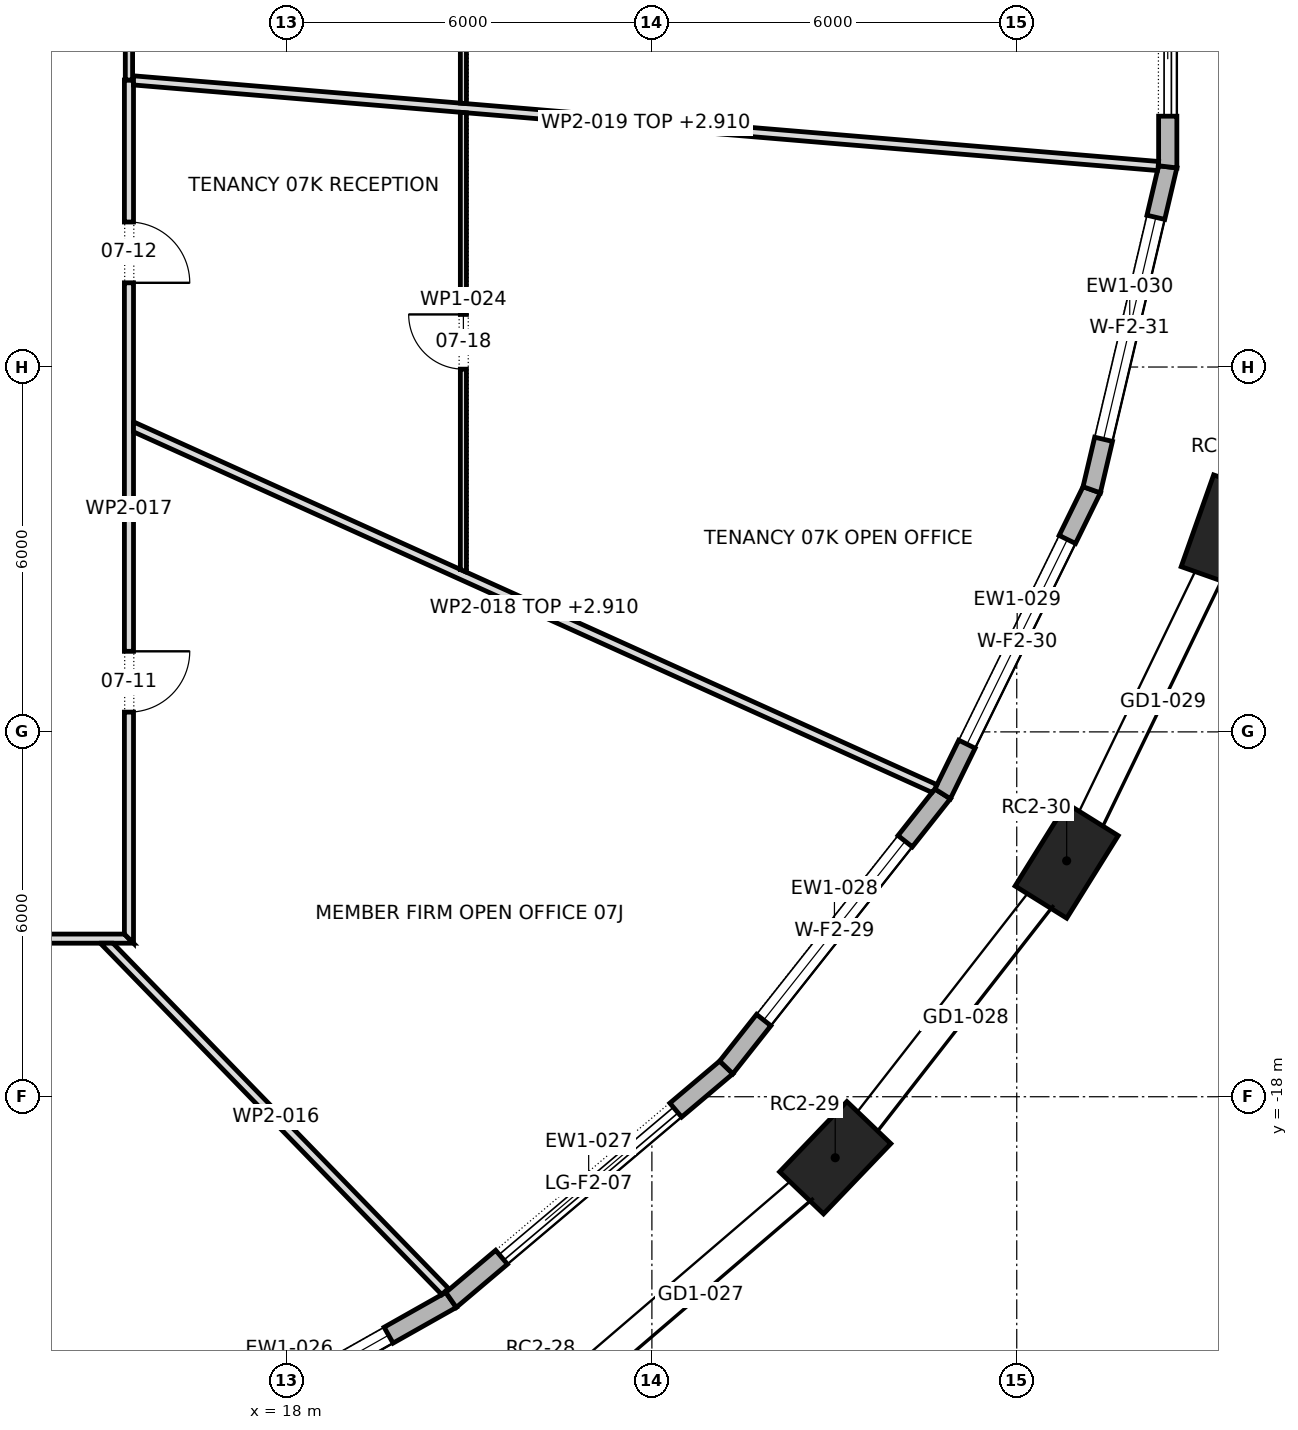
"""IFC4 building model, lengths in metres.
Left out: names, types, materials, properties, quantities, classifications, styles, units other than length and angle.
Written with IfcOpenShell. Run it as: python <this file> out.ifc"""

import sys

from ifc_helpers import new_model, si_unit, direction, frame, frame_2d, origin, origin_2d, place, context, subcontext, project, spatial, polyline, rectangle, outline, extrude, element, fill, save


model = new_model("IFC4")
c1 = context("Model", 3, precision=1e-05, world=origin(), true_north=direction((0.0, 1.0)))
c2 = subcontext(c1, "Body", "Model", "MODEL_VIEW")
j1 = project(units=[si_unit("LENGTHUNIT", "METRE"), si_unit("PLANEANGLEUNIT", "RADIAN")], contexts=[c1])
p1 = place(None, origin())
s1 = spatial("IfcSite", under=j1, at=p1, CompositionType="ELEMENT")
p2 = place(p1, origin())
s2 = spatial("IfcBuilding", under=s1, at=p2, CompositionType="ELEMENT")
p3 = place(p2, frame((0.0, 0.0, 112.9)))
s3 = spatial("IfcBuildingStorey", under=s2, at=p3, CompositionType="ELEMENT", Elevation=112.9)
for number, where, z_axis, x_axis in (
    (1, (27.015, -19.003, 0.0), (0.0, 0.0, 1.0), (0.692, 0.722, 0.0)),
    (2, (30.821, -14.121, 0.0), (0.0, 0.0, 1.0), (0.529, 0.849, 0.0)),
    (3, (33.443, -8.695, 0.0), (0.0, 0.0, 1.0), (0.334, 0.943, 0.0)),
):
    element("IfcColumn", number, at=place(p3, frame(where, z_axis=z_axis, x_axis=x_axis)), inside=s3, PredefinedType="COLUMN", context=c2, shape_type="SweptSolid", body=[
        extrude(rectangle(XDim=1.6, YDim=1.0, at=origin_2d()), origin(), (0.0, 0.0, 1.0), 4.2),
    ])
p4 = place(p3, frame((15.377, -24.344, 0.0), z_axis=(0.0, 0.0, 1.0), x_axis=(0.870828448417, 0.491587035455, 0.0)))
e4 = element("IfcWall", 4, at=p4, inside=s3, PredefinedType="STANDARD", context=c2, shape_type="SweptSolid", body=[
    extrude(outline(polyline([(-0.013, -0.15), (6.123, -0.15), (6.094, 0.15), (0.013, 0.15), (-0.013, -0.15)])), origin(), (0.0, 0.0, 1.0), 3.9),
])
p5 = place(p4, frame((1.179, 0.0, 0.6)))
e5 = element("IfcOpeningElement", 5, at=p5, cuts=e4, PredefinedType="OPENING", context=c2, shape_type="SweptSolid", body=[
    extrude(rectangle(XDim=3.75, YDim=2.85, at=frame_2d((1.875, 1.425))), frame((0.0, 0.162, 0.0), z_axis=(0.0, -1.0, 0.0), x_axis=(1.0, 0.0, 0.0)), (0.0, 0.0, 1.0), 0.324),
])
p6 = place(p3, frame((20.697, -21.341, 0.0), z_axis=(0.0, 0.0, 1.0), x_axis=(0.763894031266, 0.645341699409, 0.0)))
e6 = element("IfcWall", 6, at=p6, inside=s3, PredefinedType="STANDARD", context=c2, shape_type="SweptSolid", body=[
    extrude(outline(polyline([(-0.014, -0.15), (5.94, -0.15), (5.91, 0.15), (0.014, 0.15), (-0.014, -0.15)])), origin(), (0.0, 0.0, 1.0), 3.9),
])
p7 = place(p6, frame((1.087, 0.0, 0.0)))
e7 = element("IfcOpeningElement", 7, at=p7, cuts=e6, PredefinedType="OPENING", context=c2, shape_type="SweptSolid", body=[
    extrude(rectangle(XDim=3.75, YDim=3.45, at=frame_2d((1.875, 1.725))), frame((0.0, 0.162, 0.0), z_axis=(0.0, -1.0, 0.0), x_axis=(1.0, 0.0, 0.0)), (0.0, 0.0, 1.0), 0.324),
])
p8 = place(p3, frame((25.223, -17.518, 0.0), z_axis=(0.0, 0.0, 1.0), x_axis=(0.620329992039, 0.784340934146, 0.0)))
e8 = element("IfcWall", 8, at=p8, inside=s3, PredefinedType="STANDARD", context=c2, shape_type="SweptSolid", body=[
    extrude(outline(polyline([(-0.015, -0.15), (5.751, -0.15), (5.719, 0.15), (0.015, 0.15), (-0.015, -0.15)])), origin(), (0.0, 0.0, 1.0), 3.9),
])
p9 = place(p8, frame((0.993, 0.0, 0.6)))
e9 = element("IfcOpeningElement", 9, at=p9, cuts=e8, PredefinedType="OPENING", context=c2, shape_type="SweptSolid", body=[
    extrude(rectangle(XDim=3.75, YDim=2.85, at=frame_2d((1.875, 1.425))), frame((0.0, 0.162, 0.0), z_axis=(0.0, -1.0, 0.0), x_axis=(1.0, 0.0, 0.0)), (0.0, 0.0, 1.0), 0.324),
])
p10 = place(p3, frame((28.781, -13.019, 0.0), z_axis=(0.0, 0.0, 1.0), x_axis=(0.440238988749, 0.897880633929, 0.0)))
e10 = element("IfcWall", 10, at=p10, inside=s3, PredefinedType="STANDARD", context=c2, shape_type="SweptSolid", body=[
    extrude(outline(polyline([(-0.016, -0.15), (5.586, -0.15), (5.553, 0.15), (0.016, 0.15), (-0.016, -0.15)])), origin(), (0.0, 0.0, 1.0), 3.9),
])
p11 = place(p10, frame((0.91, 0.0, 0.6)))
e11 = element("IfcOpeningElement", 11, at=p11, cuts=e10, PredefinedType="OPENING", context=c2, shape_type="SweptSolid", body=[
    extrude(rectangle(XDim=3.75, YDim=2.85, at=frame_2d((1.875, 1.425))), frame((0.0, 0.162, 0.0), z_axis=(0.0, -1.0, 0.0), x_axis=(1.0, 0.0, 0.0)), (0.0, 0.0, 1.0), 0.324),
])
p12 = place(p3, frame((31.233, -8.019, 0.0), z_axis=(0.0, 0.0, 1.0), x_axis=(0.229193964616, 0.973380771632, 0.0)))
e12 = element("IfcWall", 12, at=p12, inside=s3, PredefinedType="STANDARD", context=c2, shape_type="SweptSolid", body=[
    extrude(outline(polyline([(-0.017, -0.15), (5.473, -0.15), (5.439, 0.15), (0.017, 0.15), (-0.017, -0.15)])), origin(), (0.0, 0.0, 1.0), 3.9),
])
p13 = place(p12, frame((0.853, 0.0, 0.6)))
e13 = element("IfcOpeningElement", 13, at=p13, cuts=e12, PredefinedType="OPENING", context=c2, shape_type="SweptSolid", body=[
    extrude(rectangle(XDim=3.75, YDim=2.85, at=frame_2d((1.875, 1.425))), frame((0.0, 0.162, 0.0), z_axis=(0.0, -1.0, 0.0), x_axis=(1.0, 0.0, 0.0)), (0.0, 0.0, 1.0), 0.324),
])
p14 = place(p3, frame((32.483, -2.708, 0.0), z_axis=(0.0, 0.0, 1.0), x_axis=(0.0, 1.0, 0.0)))
e14 = element("IfcWall", 14, at=p14, inside=s3, PredefinedType="STANDARD", context=c2, shape_type="SweptSolid", body=[
    extrude(outline(polyline([(-0.017, -0.15), (5.433, -0.15), (5.398, 0.15), (0.017, 0.15), (-0.017, -0.15)])), origin(), (0.0, 0.0, 1.0), 3.9),
])
p15 = place(p14, frame((0.833, 0.0, 0.0)))
e15 = element("IfcOpeningElement", 15, at=p15, cuts=e14, PredefinedType="OPENING", context=c2, shape_type="SweptSolid", body=[
    extrude(rectangle(XDim=3.75, YDim=3.45, at=frame_2d((1.875, 1.725))), frame((0.0, 0.162, 0.0), z_axis=(0.0, -1.0, 0.0), x_axis=(1.0, 0.0, 0.0)), (0.0, 0.0, 1.0), 0.324),
])
p16 = place(p3, frame((-15.475, -15.4, 0.0), z_axis=(0.0, 0.0, 1.0), x_axis=(1.0, 0.0, 0.0)))
e16 = element("IfcWall", 16, at=p16, inside=s3, PredefinedType="PARTITIONING", context=c2, shape_type="SweptSolid", body=[
    extrude(outline(polyline([(0.0, -0.075), (1.935, -0.075), (3.869, -0.075), (5.803, -0.075), (7.738, -0.075), (9.672, -0.075), (11.606, -0.075), (13.541, -0.075), (15.475, -0.075), (17.409, -0.075), (19.344, -0.075), (21.278, -0.075), (23.212, -0.075), (25.147, -0.075), (27.081, -0.075), (29.016, -0.075), (30.95, -0.075), (30.8, 0.075), (28.885, 0.075), (26.969, 0.075), (25.053, 0.075), (23.138, 0.075), (21.222, 0.075), (19.306, 0.075), (17.391, 0.075), (15.475, 0.075), (13.56, 0.075), (11.644, 0.075), (9.728, 0.075), (7.812, 0.075), (5.897, 0.075), (3.981, 0.075), (2.066, 0.075), (0.15, 0.075), (0.0, -0.075)])), origin(), (0.0, 0.0, 1.0), 3.9),
])
p17 = place(p16, frame((2.405, 0.0, 0.0)))
e17 = element("IfcOpeningElement", 17, at=p17, cuts=e16, PredefinedType="OPENING", context=c2, shape_type="SweptSolid", body=[
    extrude(rectangle(XDim=1.0, YDim=2.1, at=frame_2d((0.5, 1.05))), frame((0.0, 0.087, 0.0), z_axis=(0.0, -1.0, 0.0), x_axis=(1.0, 0.0, 0.0)), (0.0, 0.0, 1.0), 0.174),
])
p18 = place(p16, frame((10.605, 0.0, 0.0)))
e18 = element("IfcOpeningElement", 18, at=p18, cuts=e16, PredefinedType="OPENING", context=c2, shape_type="SweptSolid", body=[
    extrude(rectangle(XDim=1.8, YDim=2.1, at=frame_2d((0.9, 1.05))), frame((0.0, 0.087, 0.0), z_axis=(0.0, -1.0, 0.0), x_axis=(1.0, 0.0, 0.0)), (0.0, 0.0, 1.0), 0.174),
])
p19 = place(p16, frame((22.955, 0.0, 0.0)))
e19 = element("IfcOpeningElement", 19, at=p19, cuts=e16, PredefinedType="OPENING", context=c2, shape_type="SweptSolid", body=[
    extrude(rectangle(XDim=1.8, YDim=2.1, at=frame_2d((0.9, 1.05))), frame((0.0, 0.087, 0.0), z_axis=(0.0, -1.0, 0.0), x_axis=(1.0, 0.0, 0.0)), (0.0, 0.0, 1.0), 0.174),
])
p20 = place(p3, frame((14.982, -15.423, 0.0), z_axis=(0.0, 0.0, 1.0), x_axis=(0.696915710248, -0.717153046992, 0.0)))
e20 = element("IfcWall", 20, at=p20, inside=s3, PredefinedType="PARTITIONING", context=c2, shape_type="SweptSolid", body=[
    extrude(outline(polyline([(8.059, 0.075), (6.08, 0.075), (4.102, 0.075), (2.124, 0.075), (0.146, 0.075), (0.0, -0.075), (0.0, -0.075), (1.612, -0.075), (3.223, -0.075), (4.835, -0.075), (6.447, -0.075), (8.059, -0.075), (8.059, 0.075)])), origin(), (0.0, 0.0, 1.0), 3.9),
])
p21 = place(p3, frame((15.4, -15.475, 0.0), z_axis=(0.0, 0.0, 1.0), x_axis=(0.0, 1.0, 0.0)))
e21 = element("IfcWall", 21, at=p21, inside=s3, PredefinedType="PARTITIONING", context=c2, shape_type="SweptSolid", body=[
    extrude(outline(polyline([(14.195, 0.075), (12.439, 0.075), (10.684, 0.075), (8.928, 0.075), (7.173, 0.075), (5.417, 0.075), (3.661, 0.075), (1.906, 0.075), (0.15, 0.075), (0.0, -0.075), (1.775, -0.075), (3.549, -0.075), (5.323, -0.075), (7.098, -0.075), (8.872, -0.075), (10.646, -0.075), (12.421, -0.075), (14.195, -0.075), (14.195, 0.075)])), origin(), (0.0, 0.0, 1.0), 3.9),
])
p22 = place(p21, frame((3.8, 0.0, 0.0)))
e22 = element("IfcOpeningElement", 22, at=p22, cuts=e21, PredefinedType="OPENING", context=c2, shape_type="SweptSolid", body=[
    extrude(rectangle(XDim=1.0, YDim=2.1, at=frame_2d((0.5, 1.05))), frame((0.0, 0.087, 0.0), z_axis=(0.0, -1.0, 0.0), x_axis=(1.0, 0.0, 0.0)), (0.0, 0.0, 1.0), 0.174),
])
p23 = place(p21, frame((10.86, 0.0, 0.0)))
e23 = element("IfcOpeningElement", 23, at=p23, cuts=e21, PredefinedType="OPENING", context=c2, shape_type="SweptSolid", body=[
    extrude(rectangle(XDim=1.0, YDim=2.1, at=frame_2d((0.5, 1.05))), frame((0.0, 0.087, 0.0), z_axis=(0.0, -1.0, 0.0), x_axis=(1.0, 0.0, 0.0)), (0.0, 0.0, 1.0), 0.174),
])
p24 = place(p3, frame((15.444, -6.97, 0.0), z_axis=(0.0, 0.0, 1.0), x_axis=(0.911385678544, -0.411553331835, 0.0)))
e24 = element("IfcWall", 24, at=p24, inside=s3, PredefinedType="PARTITIONING", context=c2, shape_type="SweptSolid", body=[
    extrude(outline(polyline([(0.068, -0.075), (1.869, -0.075), (3.67, -0.075), (5.471, -0.075), (7.272, -0.075), (9.074, -0.075), (10.875, -0.075), (12.676, -0.075), (14.477, -0.075), (14.495, -0.004), (14.497, 0.058), (14.497, 0.075), (12.778, 0.075), (11.058, 0.075), (9.339, 0.075), (7.62, 0.075), (5.9, 0.075), (5.898, 0.074), (5.898, 0.075), (3.932, 0.075), (1.966, 0.075), (0.0, 0.075), (0.068, -0.075)])), origin(), (0.0, 0.0, 1.0), 2.91),
])
p25 = place(p3, frame((15.454, -1.284, 0.0), z_axis=(0.0, 0.0, 1.0), x_axis=(0.996525641357, -0.083286530234, 0.0)))
e25 = element("IfcWall", 25, at=p25, inside=s3, PredefinedType="PARTITIONING", context=c2, shape_type="SweptSolid", body=[
    extrude(outline(polyline([(0.028, -0.075), (1.905, -0.075), (3.783, -0.075), (5.66, -0.075), (7.538, -0.075), (9.416, -0.075), (11.293, -0.075), (13.171, -0.075), (15.048, -0.075), (16.926, -0.075), (16.931, -0.038), (16.931, 0.075), (15.05, 0.075), (13.169, 0.075), (11.288, 0.075), (9.406, 0.075), (7.525, 0.075), (5.644, 0.075), (3.762, 0.075), (1.881, 0.075), (0.0, 0.075), (0.0, 0.074), (0.006, 0.005), (0.021, 0.006), (0.028, -0.075)])), origin(), (0.0, 0.0, 1.0), 2.91),
])
p26 = place(p3, frame((15.4, 2.88, 0.0), z_axis=(0.0, 0.0, 1.0), x_axis=(0.0, -1.0, 0.0)))
e26 = element("IfcWall", 26, at=p26, inside=s3, PredefinedType="PARTITIONING", context=c2, shape_type="SweptSolid", body=[
    extrude(rectangle(XDim=4.16, YDim=0.12, at=frame_2d((2.08, 0.0))), origin(), (0.0, 0.0, 1.0), 3.9),
])
p27 = place(p26, frame((1.58, 0.0, 0.0)))
e27 = element("IfcOpeningElement", 27, at=p27, cuts=e26, PredefinedType="OPENING", context=c2, shape_type="SweptSolid", body=[
    extrude(rectangle(XDim=1.0, YDim=2.1, at=frame_2d((0.5, 1.05))), frame((0.0, 0.072, 0.0), z_axis=(0.0, -1.0, 0.0), x_axis=(1.0, 0.0, 0.0)), (0.0, 0.0, 1.0), 0.144),
])
p28 = place(p3, frame((20.9, -1.811, 0.0), z_axis=(0.0, 0.0, 1.0), x_axis=(0.0, -1.0, 0.0)))
e28 = element("IfcWall", 28, at=p28, inside=s3, PredefinedType="PARTITIONING", context=c2, shape_type="SweptSolid", body=[
    extrude(outline(polyline([(0.0, -0.05), (1.879, -0.05), (3.759, -0.05), (5.638, -0.05), (7.518, -0.05), (7.562, 0.049), (7.562, 0.05), (5.674, 0.05), (3.785, 0.05), (1.897, 0.05), (0.008, 0.05), (0.0, -0.047), (0.0, -0.05)])), origin(), (0.0, 0.0, 1.0), 3.9),
])
p29 = place(p28, frame((3.324, 0.0, 0.0)))
e29 = element("IfcOpeningElement", 29, at=p29, cuts=e28, PredefinedType="OPENING", context=c2, shape_type="SweptSolid", body=[
    extrude(rectangle(XDim=0.9, YDim=2.1, at=frame_2d((0.45, 1.05))), frame((0.0, 0.062, 0.0), z_axis=(0.0, -1.0, 0.0), x_axis=(1.0, 0.0, 0.0)), (0.0, 0.0, 1.0), 0.124),
])
p30 = place(p3, frame((20.9, -1.668, 0.0), z_axis=(0.0, 0.0, 1.0), x_axis=(0.0, 1.0, 0.0)))
e30 = element("IfcWall", 30, at=p30, inside=s3, PredefinedType="PARTITIONING", context=c2, shape_type="SweptSolid", body=[
    extrude(outline(polyline([(16.102, -0.05), (16.102, -0.05), (16.032, 0.05), (14.127, 0.05), (12.221, 0.05), (10.315, 0.05), (8.41, 0.05), (6.504, 0.05), (4.598, 0.05), (4.598, 0.05), (4.499, 0.05), (4.499, 0.05), (3.002, 0.05), (1.505, 0.05), (0.008, 0.05), (0.0, -0.049), (0.0, -0.05), (1.789, -0.05), (3.578, -0.05), (5.367, -0.05), (7.156, -0.05), (8.945, -0.05), (10.734, -0.05), (12.523, -0.05), (14.312, -0.05), (16.102, -0.05)])), origin(), (0.0, 0.0, 1.0), 3.9),
])
p31 = place(p30, frame((9.904, 0.0, 0.0)))
e31 = element("IfcOpeningElement", 31, at=p31, cuts=e30, PredefinedType="OPENING", context=c2, shape_type="SweptSolid", body=[
    extrude(rectangle(XDim=0.9, YDim=2.1, at=frame_2d((0.45, 1.05))), frame((0.0, 0.062, 0.0), z_axis=(0.0, -1.0, 0.0), x_axis=(1.0, 0.0, 0.0)), (0.0, 0.0, 1.0), 0.124),
])
p32 = place(p5, origin())
e32 = element("IfcWindow", 32, at=p32, inside=s3, PartitioningType="TRIPLE_PANEL_VERTICAL", PredefinedType="WINDOW", context=c2, shape_type="SweptSolid", body=[
    extrude(rectangle(XDim=3.75, YDim=2.85, at=frame_2d((1.875, 1.425))), frame((0.0, 0.03, 0.0), z_axis=(0.0, -1.0, 0.0), x_axis=(1.0, 0.0, 0.0)), (0.0, 0.0, 1.0), 0.06),
])
fill(e5, e32)
p33 = place(p7, origin())
e33 = element("IfcDoor", 33, at=p33, inside=s3, OperationType="DOUBLE_DOOR_SLIDING", PredefinedType="DOOR", context=c2, shape_type="SweptSolid", body=[
    extrude(rectangle(XDim=3.75, YDim=3.45, at=frame_2d((1.875, 1.725))), frame((0.0, 0.025, 0.0), z_axis=(0.0, -1.0, 0.0), x_axis=(1.0, 0.0, 0.0)), (0.0, 0.0, 1.0), 0.05),
])
fill(e7, e33)
p34 = place(p9, origin())
e34 = element("IfcWindow", 34, at=p34, inside=s3, PartitioningType="TRIPLE_PANEL_VERTICAL", PredefinedType="WINDOW", context=c2, shape_type="SweptSolid", body=[
    extrude(rectangle(XDim=3.75, YDim=2.85, at=frame_2d((1.875, 1.425))), frame((0.0, 0.03, 0.0), z_axis=(0.0, -1.0, 0.0), x_axis=(1.0, 0.0, 0.0)), (0.0, 0.0, 1.0), 0.06),
])
fill(e9, e34)
p35 = place(p11, origin())
e35 = element("IfcWindow", 35, at=p35, inside=s3, PartitioningType="TRIPLE_PANEL_VERTICAL", PredefinedType="WINDOW", context=c2, shape_type="SweptSolid", body=[
    extrude(rectangle(XDim=3.75, YDim=2.85, at=frame_2d((1.875, 1.425))), frame((0.0, 0.03, 0.0), z_axis=(0.0, -1.0, 0.0), x_axis=(1.0, 0.0, 0.0)), (0.0, 0.0, 1.0), 0.06),
])
fill(e11, e35)
p36 = place(p13, origin())
e36 = element("IfcWindow", 36, at=p36, inside=s3, PartitioningType="TRIPLE_PANEL_VERTICAL", PredefinedType="WINDOW", context=c2, shape_type="SweptSolid", body=[
    extrude(rectangle(XDim=3.75, YDim=2.85, at=frame_2d((1.875, 1.425))), frame((0.0, 0.03, 0.0), z_axis=(0.0, -1.0, 0.0), x_axis=(1.0, 0.0, 0.0)), (0.0, 0.0, 1.0), 0.06),
])
fill(e13, e36)
p37 = place(p15, origin())
e37 = element("IfcDoor", 37, at=p37, inside=s3, OperationType="DOUBLE_DOOR_SLIDING", PredefinedType="DOOR", context=c2, shape_type="SweptSolid", body=[
    extrude(rectangle(XDim=3.75, YDim=3.45, at=frame_2d((1.875, 1.725))), frame((0.0, 0.025, 0.0), z_axis=(0.0, -1.0, 0.0), x_axis=(1.0, 0.0, 0.0)), (0.0, 0.0, 1.0), 0.05),
])
fill(e15, e37)
p38 = place(p22, frame((1.0, 0.0, 0.0), z_axis=(0.0, 0.0, 1.0), x_axis=(-1.0, 0.0, 0.0)))
e38 = element("IfcDoor", 38, at=p38, inside=s3, OperationType="SINGLE_SWING_RIGHT", PredefinedType="DOOR", context=c2, shape_type="SweptSolid", body=[
    extrude(rectangle(XDim=1.0, YDim=2.1, at=frame_2d((0.5, 1.05))), frame((0.0, 0.025, 0.0), z_axis=(0.0, -1.0, 0.0), x_axis=(1.0, 0.0, 0.0)), (0.0, 0.0, 1.0), 0.05),
])
fill(e22, e38)
p39 = place(p23, frame((1.0, 0.0, 0.0), z_axis=(0.0, 0.0, 1.0), x_axis=(-1.0, 0.0, 0.0)))
e39 = element("IfcDoor", 39, at=p39, inside=s3, OperationType="SINGLE_SWING_LEFT", PredefinedType="DOOR", context=c2, shape_type="SweptSolid", body=[
    extrude(rectangle(XDim=1.0, YDim=2.1, at=frame_2d((0.5, 1.05))), frame((0.0, 0.025, 0.0), z_axis=(0.0, -1.0, 0.0), x_axis=(1.0, 0.0, 0.0)), (0.0, 0.0, 1.0), 0.05),
])
fill(e23, e39)
p40 = place(p29, frame((0.9, 0.0, 0.0), z_axis=(0.0, 0.0, 1.0), x_axis=(-1.0, 0.0, 0.0)))
e40 = element("IfcDoor", 40, at=p40, inside=s3, OperationType="SINGLE_SWING_LEFT", PredefinedType="DOOR", context=c2, shape_type="SweptSolid", body=[
    extrude(rectangle(XDim=0.9, YDim=2.1, at=frame_2d((0.45, 1.05))), frame((0.0, 0.025, 0.0), z_axis=(0.0, -1.0, 0.0), x_axis=(1.0, 0.0, 0.0)), (0.0, 0.0, 1.0), 0.05),
])
fill(e29, e40)
save(model, sys.argv[1])
